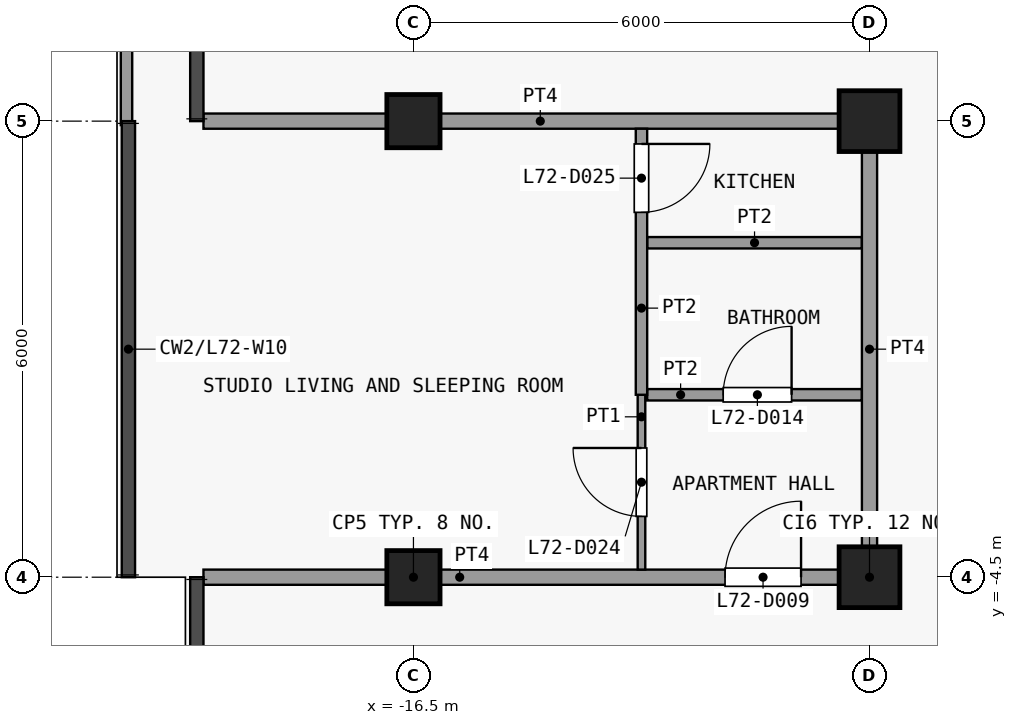
"""IFC4 building model, lengths in metres.
Left out: names, types, materials, properties, quantities, classifications, styles, units other than length and angle.
Written with IfcOpenShell. Run it as: python <this file> out.ifc"""

import sys

from ifc_helpers import new_model, si_unit, direction, frame, frame_2d, origin, origin_2d, place, context, subcontext, project, spatial, rectangle, extrude, element, fill, save


model = new_model("IFC4")
c1 = context("Model", 3, precision=1e-05, world=origin(), true_north=direction((0.0, 1.0)))
c2 = subcontext(c1, "Body", "Model", "MODEL_VIEW")
j1 = project(units=[si_unit("LENGTHUNIT", "METRE"), si_unit("PLANEANGLEUNIT", "RADIAN")], contexts=[c1])
p1 = place(None, origin())
s1 = spatial("IfcSite", under=j1, at=p1, CompositionType="ELEMENT")
p2 = place(p1, origin())
s2 = spatial("IfcBuilding", under=s1, at=p2, CompositionType="ELEMENT")
p3 = place(p2, frame((0.0, 0.0, 284.3)))
s3 = spatial("IfcBuildingStorey", under=s2, at=p3, CompositionType="ELEMENT", Elevation=284.3)
for number, where, z_axis, x_axis in (
    (1, (-16.5, -4.5, 0.0), (0.0, 0.0, 1.0), (1.0, 0.0, 0.0)),
    (2, (-16.5, 1.5, 0.0), (0.0, 0.0, 1.0), (1.0, 0.0, 0.0)),
):
    element("IfcColumn", number, at=place(p3, frame(where, z_axis=z_axis, x_axis=x_axis)), inside=s3, PredefinedType="COLUMN", context=c2, shape_type="SweptSolid", body=[
        extrude(rectangle(XDim=0.7, YDim=0.7, at=origin_2d()), origin(), (0.0, 0.0, 1.0), 3.6),
    ])
for number, where, z_axis, x_axis in (
    (3, (-10.5, -4.5, 0.0), (0.0, 0.0, 1.0), (1.0, 0.0, 0.0)),
    (4, (-10.5, 1.5, 0.0), (0.0, 0.0, 1.0), (1.0, 0.0, 0.0)),
):
    element("IfcColumn", number, at=place(p3, frame(where, z_axis=z_axis, x_axis=x_axis)), inside=s3, PredefinedType="COLUMN", context=c2, shape_type="SweptSolid", body=[
        extrude(rectangle(XDim=0.8, YDim=0.8, at=origin_2d()), origin(), (0.0, 0.0, 1.0), 3.6),
    ])
p4 = place(p3, frame((-20.275, 1.448, 0.0), z_axis=(0.0, 0.0, 1.0), x_axis=(0.0, 1.0, 0.0)))
e5 = element("IfcWall", 5, at=p4, inside=s3, PredefinedType="PARAPET", context=c2, shape_type="SweptSolid", body=[
    extrude(rectangle(XDim=6.002, YDim=0.15, at=frame_2d((3.001, 0.0))), origin(), (0.0, 0.0, 1.0), 1.15),
])
p5 = place(p3, frame((-19.262, -4.5, 0.0), z_axis=(0.0, 0.0, 1.0), x_axis=(1.0, 0.0, 0.0)))
e6 = element("IfcWall", 6, at=p5, inside=s3, PredefinedType="PARTITIONING", context=c2, shape_type="SweptSolid", body=[
    extrude(rectangle(XDim=8.863, YDim=0.2, at=frame_2d((4.431, 0.0))), origin(), (0.0, 0.0, 1.0), 3.3),
])
p6 = place(p5, frame((6.862, 0.0, 0.0)))
e7 = element("IfcOpeningElement", 7, at=p6, cuts=e6, PredefinedType="OPENING", context=c2, shape_type="SweptSolid", body=[
    extrude(rectangle(XDim=1.0, YDim=2.1, at=frame_2d((0.5, 1.05))), frame((0.0, 0.11, 0.0), z_axis=(0.0, -1.0, 0.0), x_axis=(1.0, 0.0, 0.0)), (0.0, 0.0, 1.0), 0.22),
])
p7 = place(p3, frame((-13.425, -2.1, 0.0), z_axis=(0.0, 0.0, 1.0), x_axis=(1.0, 0.0, 0.0)))
e8 = element("IfcWall", 8, at=p7, inside=s3, PredefinedType="PARTITIONING", context=c2, shape_type="SweptSolid", body=[
    extrude(rectangle(XDim=2.825, YDim=0.15, at=frame_2d((1.413, 0.0))), origin(), (0.0, 0.0, 1.0), 3.3),
])
p8 = place(p7, frame((1.0, 0.0, 0.0)))
e9 = element("IfcOpeningElement", 9, at=p8, cuts=e8, PredefinedType="OPENING", context=c2, shape_type="SweptSolid", body=[
    extrude(rectangle(XDim=0.9, YDim=2.1, at=frame_2d((0.45, 1.05))), frame((0.0, 0.085, 0.0), z_axis=(0.0, -1.0, 0.0), x_axis=(1.0, 0.0, 0.0)), (0.0, 0.0, 1.0), 0.17),
])
p9 = place(p3, frame((-13.425, -0.1, 0.0), z_axis=(0.0, 0.0, 1.0), x_axis=(1.0, 0.0, 0.0)))
e10 = element("IfcWall", 10, at=p9, inside=s3, PredefinedType="PARTITIONING", context=c2, shape_type="SweptSolid", body=[
    extrude(rectangle(XDim=2.825, YDim=0.15, at=frame_2d((1.413, 0.0))), origin(), (0.0, 0.0, 1.0), 3.3),
])
p10 = place(p3, frame((-19.262, 1.5, 0.0), z_axis=(0.0, 0.0, 1.0), x_axis=(1.0, 0.0, 0.0)))
e11 = element("IfcWall", 11, at=p10, inside=s3, PredefinedType="PARTITIONING", context=c2, shape_type="SweptSolid", body=[
    extrude(rectangle(XDim=8.863, YDim=0.2, at=frame_2d((4.431, 0.0))), origin(), (0.0, 0.0, 1.0), 3.3),
])
p11 = place(p3, frame((-13.5, -4.4, 0.0), z_axis=(0.0, 0.0, 1.0), x_axis=(0.0, 1.0, 0.0)))
e12 = element("IfcWall", 12, at=p11, inside=s3, PredefinedType="PARTITIONING", context=c2, shape_type="SweptSolid", body=[
    extrude(rectangle(XDim=2.3, YDim=0.1, at=frame_2d((1.15, 0.0))), origin(), (0.0, 0.0, 1.0), 3.3),
])
p12 = place(p11, frame((0.7, 0.0, 0.0)))
e13 = element("IfcOpeningElement", 13, at=p12, cuts=e12, PredefinedType="OPENING", context=c2, shape_type="SweptSolid", body=[
    extrude(rectangle(XDim=0.9, YDim=2.1, at=frame_2d((0.45, 1.05))), frame((0.0, 0.06, 0.0), z_axis=(0.0, -1.0, 0.0), x_axis=(1.0, 0.0, 0.0)), (0.0, 0.0, 1.0), 0.12),
])
p13 = place(p3, frame((-13.5, -2.1, 0.0), z_axis=(0.0, 0.0, 1.0), x_axis=(0.0, 1.0, 0.0)))
e14 = element("IfcWall", 14, at=p13, inside=s3, PredefinedType="PARTITIONING", context=c2, shape_type="SweptSolid", body=[
    extrude(rectangle(XDim=3.5, YDim=0.15, at=frame_2d((1.75, 0.0))), origin(), (0.0, 0.0, 1.0), 3.3),
])
p14 = place(p13, frame((2.4, 0.0, 0.0)))
e15 = element("IfcOpeningElement", 15, at=p14, cuts=e14, PredefinedType="OPENING", context=c2, shape_type="SweptSolid", body=[
    extrude(rectangle(XDim=0.9, YDim=2.1, at=frame_2d((0.45, 1.05))), frame((0.0, 0.085, 0.0), z_axis=(0.0, -1.0, 0.0), x_axis=(1.0, 0.0, 0.0)), (0.0, 0.0, 1.0), 0.17),
])
p15 = place(p3, frame((-10.5, -4.4, 0.0), z_axis=(0.0, 0.0, 1.0), x_axis=(0.0, 1.0, 0.0)))
e16 = element("IfcWall", 16, at=p15, inside=s3, PredefinedType="PARTITIONING", context=c2, shape_type="SweptSolid", body=[
    extrude(rectangle(XDim=5.8, YDim=0.2, at=frame_2d((2.9, 0.0))), origin(), (0.0, 0.0, 1.0), 3.3),
])
p16 = place(p6, origin())
e17 = element("IfcDoor", 17, at=p16, inside=s3, OperationType="SINGLE_SWING_LEFT", PredefinedType="DOOR", context=c2, shape_type="SweptSolid", body=[
    extrude(rectangle(XDim=1.0, YDim=2.1, at=frame_2d((0.5, 1.05))), frame((0.0, 0.025, 0.0), z_axis=(0.0, -1.0, 0.0), x_axis=(1.0, 0.0, 0.0)), (0.0, 0.0, 1.0), 0.05),
])
fill(e7, e17)
p17 = place(p8, origin())
e18 = element("IfcDoor", 18, at=p17, inside=s3, OperationType="SINGLE_SWING_LEFT", PredefinedType="DOOR", context=c2, shape_type="SweptSolid", body=[
    extrude(rectangle(XDim=0.9, YDim=2.1, at=frame_2d((0.45, 1.05))), frame((0.0, 0.025, 0.0), z_axis=(0.0, -1.0, 0.0), x_axis=(1.0, 0.0, 0.0)), (0.0, 0.0, 1.0), 0.05),
])
fill(e9, e18)
p18 = place(p12, origin())
e19 = element("IfcDoor", 19, at=p18, inside=s3, OperationType="SINGLE_SWING_LEFT", PredefinedType="DOOR", context=c2, shape_type="SweptSolid", body=[
    extrude(rectangle(XDim=0.9, YDim=2.1, at=frame_2d((0.45, 1.05))), frame((0.0, 0.025, 0.0), z_axis=(0.0, -1.0, 0.0), x_axis=(1.0, 0.0, 0.0)), (0.0, 0.0, 1.0), 0.05),
])
fill(e13, e19)
p19 = place(p14, origin())
e20 = element("IfcDoor", 20, at=p19, inside=s3, OperationType="SINGLE_SWING_RIGHT", PredefinedType="DOOR", context=c2, shape_type="SweptSolid", body=[
    extrude(rectangle(XDim=0.9, YDim=2.1, at=frame_2d((0.45, 1.05))), frame((0.0, 0.025, 0.0), z_axis=(0.0, -1.0, 0.0), x_axis=(1.0, 0.0, 0.0)), (0.0, 0.0, 1.0), 0.05),
])
fill(e15, e20)
save(model, sys.argv[1])
